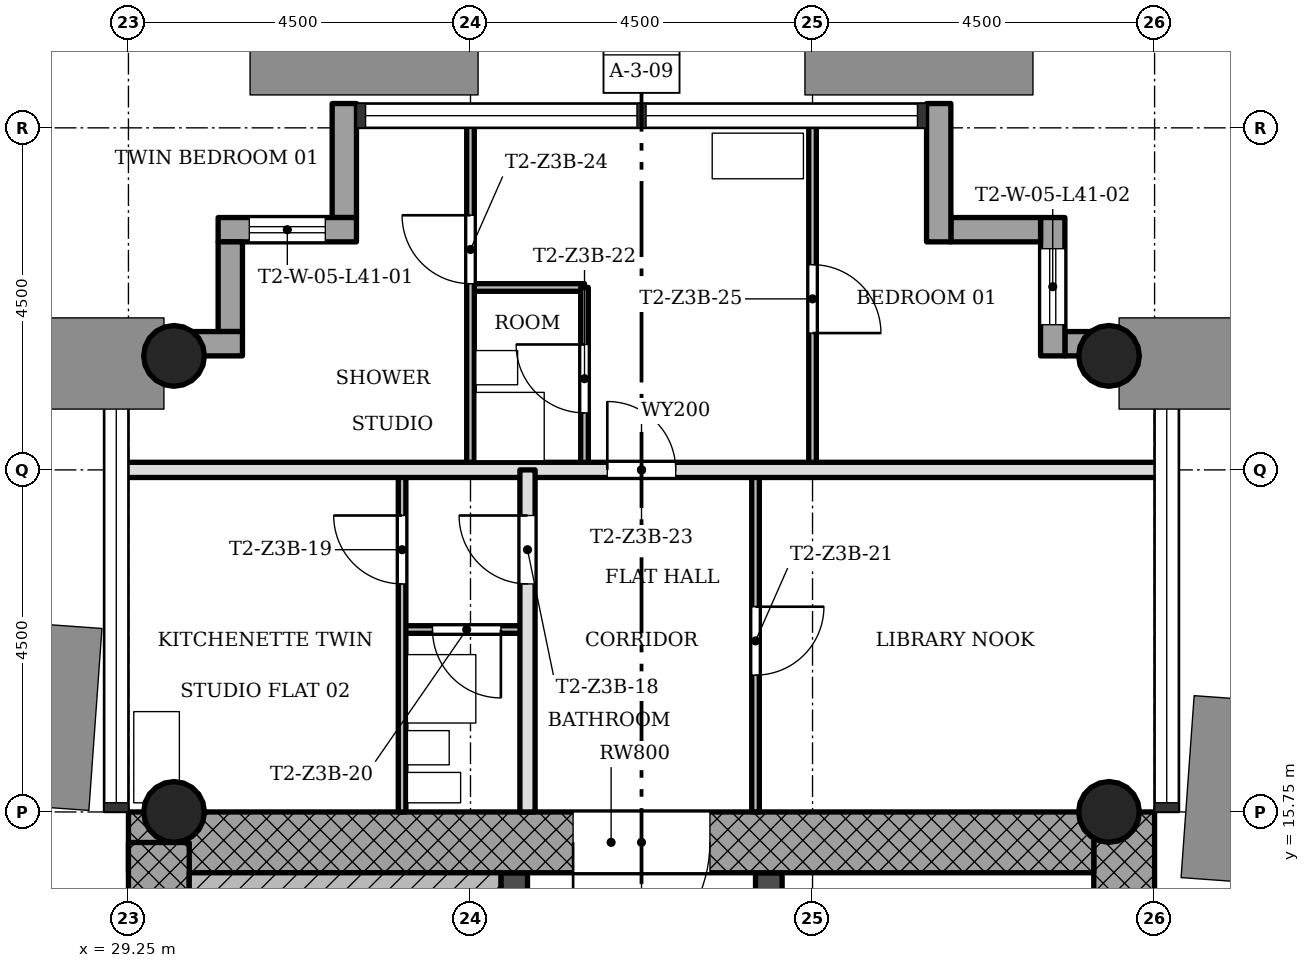
"""IFC4 building model, lengths in metres.
Left out: names, types, materials, properties, quantities, classifications, styles, units other than length and angle.
Written with IfcOpenShell. Run it as: python <this file> out.ifc"""

import sys

from ifc_helpers import new_model, si_unit, direction, frame, frame_2d, origin, origin_2d, place, context, subcontext, project, spatial, rectangle, hollow_circle, extrude, element, fill, save


model = new_model("IFC4")
c1 = context("Model", 3, precision=1e-05, world=origin(), true_north=direction((0.0, 1.0)))
c2 = subcontext(c1, "Body", "Model", "MODEL_VIEW")
j1 = project(units=[si_unit("LENGTHUNIT", "METRE"), si_unit("PLANEANGLEUNIT", "RADIAN")], contexts=[c1])
p1 = place(None, origin())
s1 = spatial("IfcSite", under=j1, at=p1, CompositionType="ELEMENT")
p2 = place(p1, origin())
s2 = spatial("IfcBuilding", under=s1, at=p2, CompositionType="ELEMENT")
p3 = place(p2, frame((0.0, 0.0, 150.7)))
s3 = spatial("IfcBuildingStorey", under=s2, at=p3, CompositionType="ELEMENT", Elevation=150.7)
p4 = place(p3, frame((42.35, 7.55, 0.0), z_axis=(0.0, 0.0, 1.0), x_axis=(0.0, 1.0, 0.0)))
e1 = element("IfcWall", 1, at=p4, inside=s3, PredefinedType="SHEAR", context=c2, shape_type="SweptSolid", body=[
    extrude(rectangle(XDim=8.2, YDim=0.8, at=frame_2d((4.1, 0.0))), origin(), (0.0, 0.0, 1.0), 3.4),
])
p5 = place(p3, frame((41.95, 15.35, 0.0), z_axis=(0.0, 0.0, 1.0), x_axis=(-1.0, 0.0, 0.0)))
e2 = element("IfcWall", 2, at=p5, inside=s3, PredefinedType="SHEAR", context=c2, shape_type="SweptSolid", body=[
    extrude(rectangle(XDim=12.7, YDim=0.8, at=frame_2d((6.35, 0.0))), origin(), (0.0, 0.0, 1.0), 3.4),
])
p6 = place(p5, frame((5.05, 0.0, 0.0)))
e3 = element("IfcOpeningElement", 3, at=p6, cuts=e2, PredefinedType="OPENING", context=c2, shape_type="SweptSolid", body=[
    extrude(rectangle(XDim=1.8, YDim=2.1, at=frame_2d((0.9, 1.05))), frame((0.0, 0.41, 0.0), z_axis=(0.0, -1.0, 0.0), x_axis=(1.0, 0.0, 0.0)), (0.0, 0.0, 1.0), 0.82),
])
p7 = place(p3, frame((29.65, 15.348, 0.0), z_axis=(0.0, 0.0, 1.0), x_axis=(0.0, -1.0, 0.0)))
e4 = element("IfcWall", 4, at=p7, inside=s3, PredefinedType="SHEAR", context=c2, shape_type="SweptSolid", body=[
    extrude(rectangle(XDim=8.796, YDim=0.8, at=frame_2d((4.398, 0.0))), origin(), (0.0, 0.0, 1.0), 3.4),
])
p8 = place(p3, frame((34.325, 7.55, 0.0), z_axis=(0.0, 0.0, 1.0), x_axis=(0.0, 1.0, 0.0)))
e5 = element("IfcWall", 5, at=p8, inside=s3, PredefinedType="SHEAR", context=c2, shape_type="SweptSolid", body=[
    extrude(rectangle(XDim=7.4, YDim=0.35, at=frame_2d((3.7, 0.0))), origin(), (0.0, 0.0, 1.0), 3.4),
])
p9 = place(p8, frame((0.85, 0.0, 0.0)))
e6 = element("IfcOpeningElement", 6, at=p9, cuts=e5, PredefinedType="OPENING", context=c2, shape_type="SweptSolid", body=[
    extrude(rectangle(XDim=0.9, YDim=2.1, at=frame_2d((0.45, 1.05))), frame((0.0, 0.185, 0.0), z_axis=(0.0, -1.0, 0.0), x_axis=(1.0, 0.0, 0.0)), (0.0, 0.0, 1.0), 0.37),
])
p10 = place(p3, frame((37.675, 7.55, 0.0), z_axis=(0.0, 0.0, 1.0), x_axis=(0.0, 1.0, 0.0)))
e7 = element("IfcWall", 7, at=p10, inside=s3, PredefinedType="SHEAR", context=c2, shape_type="SweptSolid", body=[
    extrude(rectangle(XDim=7.4, YDim=0.35, at=frame_2d((3.7, 0.0))), origin(), (0.0, 0.0, 1.0), 3.4),
])
p11 = place(p10, frame((0.95, 0.0, 0.0)))
e8 = element("IfcOpeningElement", 8, at=p11, cuts=e7, PredefinedType="OPENING", context=c2, shape_type="SweptSolid", body=[
    extrude(rectangle(XDim=1.1, YDim=2.1, at=frame_2d((0.55, 1.05))), frame((0.0, 0.185, 0.0), z_axis=(0.0, -1.0, 0.0), x_axis=(1.0, 0.0, 0.0)), (0.0, 0.0, 1.0), 0.37),
])
p12 = place(p10, frame((3.15, 0.0, 0.0)))
e9 = element("IfcOpeningElement", 9, at=p12, cuts=e7, PredefinedType="OPENING", context=c2, shape_type="SweptSolid", body=[
    extrude(rectangle(XDim=1.1, YDim=2.1, at=frame_2d((0.55, 1.05))), frame((0.0, 0.185, 0.0), z_axis=(0.0, -1.0, 0.0), x_axis=(1.0, 0.0, 0.0)), (0.0, 0.0, 1.0), 0.37),
])
p13 = place(p10, frame((5.35, 0.0, 0.0)))
e10 = element("IfcOpeningElement", 10, at=p13, cuts=e7, PredefinedType="OPENING", context=c2, shape_type="SweptSolid", body=[
    extrude(rectangle(XDim=1.1, YDim=2.1, at=frame_2d((0.55, 1.05))), frame((0.0, 0.185, 0.0), z_axis=(0.0, -1.0, 0.0), x_axis=(1.0, 0.0, 0.0)), (0.0, 0.0, 1.0), 0.37),
])
for number, where, z_axis, x_axis in (
    (11, (42.15, 15.75, 0.0), (0.0, 0.0, 1.0), (1.0, 0.0, 0.0)),
    (12, (29.85, 15.75, 0.0), (0.0, 0.0, 1.0), (1.0, 0.0, 0.0)),
    (13, (42.15, 21.75, 0.0), (0.0, 0.0, 1.0), (1.0, 0.0, 0.0)),
    (14, (29.85, 21.75, 0.0), (0.0, 0.0, 1.0), (1.0, 0.0, 0.0)),
):
    element("IfcColumn", number, at=place(p3, frame(where, z_axis=z_axis, x_axis=x_axis)), inside=s3, PredefinedType="COLUMN", context=c2, shape_type="SweptSolid", body=[
        extrude(hollow_circle(Radius=0.4, WallThickness=0.028, at=origin_2d()), origin(), (0.0, 0.0, 1.0), 3.4),
    ])
p14 = place(p3, frame((43.07, 21.91, -0.3), z_axis=(0.0, 0.0, 1.0), x_axis=(-1.0, 0.0, 0.0)))
e15 = element("IfcWall", 15, at=p14, inside=s3, PredefinedType="STANDARD", context=c2, shape_type="SweptSolid", body=[
    extrude(rectangle(XDim=1.5, YDim=0.32, at=frame_2d((0.75, 0.0))), origin(), (0.0, 0.0, 1.0), 3.4),
])
p15 = place(p3, frame((41.41, 21.75, -0.3), z_axis=(0.0, 0.0, 1.0), x_axis=(0.0, 1.0, 0.0)))
e16 = element("IfcWall", 16, at=p15, inside=s3, PredefinedType="STANDARD", context=c2, shape_type="SweptSolid", body=[
    extrude(rectangle(XDim=1.82, YDim=0.32, at=frame_2d((0.91, 0.0))), origin(), (0.0, 0.0, 1.0), 3.4),
])
p16 = place(p15, frame((0.41, 0.0, 1.2)))
e17 = element("IfcOpeningElement", 17, at=p16, cuts=e16, PredefinedType="OPENING", context=c2, shape_type="SweptSolid", body=[
    extrude(rectangle(XDim=1.0, YDim=1.5, at=frame_2d((0.5, 0.75))), frame((0.0, 0.17, 0.0), z_axis=(0.0, -1.0, 0.0), x_axis=(1.0, 0.0, 0.0)), (0.0, 0.0, 1.0), 0.34),
])
p17 = place(p3, frame((41.25, 23.41, -0.3), z_axis=(0.0, 0.0, 1.0), x_axis=(-1.0, 0.0, 0.0)))
e18 = element("IfcWall", 18, at=p17, inside=s3, PredefinedType="STANDARD", context=c2, shape_type="SweptSolid", body=[
    extrude(rectangle(XDim=1.18, YDim=0.32, at=frame_2d((0.59, 0.0))), origin(), (0.0, 0.0, 1.0), 3.4),
])
p18 = place(p3, frame((39.91, 23.25, -0.3), z_axis=(0.0, 0.0, 1.0), x_axis=(0.0, 1.0, 0.0)))
e19 = element("IfcWall", 19, at=p18, inside=s3, PredefinedType="STANDARD", context=c2, shape_type="SweptSolid", body=[
    extrude(rectangle(XDim=1.82, YDim=0.32, at=frame_2d((0.91, 0.0))), origin(), (0.0, 0.0, 1.0), 3.4),
])
p19 = place(p3, frame((32.09, 25.07, -0.3), z_axis=(0.0, 0.0, 1.0), x_axis=(0.0, -1.0, 0.0)))
e20 = element("IfcWall", 20, at=p19, inside=s3, PredefinedType="STANDARD", context=c2, shape_type="SweptSolid", body=[
    extrude(rectangle(XDim=1.5, YDim=0.32, at=frame_2d((0.75, 0.0))), origin(), (0.0, 0.0, 1.0), 3.4),
])
p20 = place(p3, frame((32.25, 23.41, -0.3), z_axis=(0.0, 0.0, 1.0), x_axis=(-1.0, 0.0, 0.0)))
e21 = element("IfcWall", 21, at=p20, inside=s3, PredefinedType="STANDARD", context=c2, shape_type="SweptSolid", body=[
    extrude(rectangle(XDim=1.82, YDim=0.32, at=frame_2d((0.91, 0.0))), origin(), (0.0, 0.0, 1.0), 3.4),
])
p21 = place(p20, frame((0.41, 0.0, 1.2)))
e22 = element("IfcOpeningElement", 22, at=p21, cuts=e21, PredefinedType="OPENING", context=c2, shape_type="SweptSolid", body=[
    extrude(rectangle(XDim=1.0, YDim=1.5, at=frame_2d((0.5, 0.75))), frame((0.0, 0.17, 0.0), z_axis=(0.0, -1.0, 0.0), x_axis=(1.0, 0.0, 0.0)), (0.0, 0.0, 1.0), 0.34),
])
p22 = place(p3, frame((30.59, 23.25, -0.3), z_axis=(0.0, 0.0, 1.0), x_axis=(0.0, -1.0, 0.0)))
e23 = element("IfcWall", 23, at=p22, inside=s3, PredefinedType="STANDARD", context=c2, shape_type="SweptSolid", body=[
    extrude(rectangle(XDim=1.18, YDim=0.32, at=frame_2d((0.59, 0.0))), origin(), (0.0, 0.0, 1.0), 3.4),
])
p23 = place(p3, frame((30.75, 21.91, -0.3), z_axis=(0.0, 0.0, 1.0), x_axis=(-1.0, 0.0, 0.0)))
e24 = element("IfcWall", 24, at=p23, inside=s3, PredefinedType="STANDARD", context=c2, shape_type="SweptSolid", body=[
    extrude(rectangle(XDim=1.82, YDim=0.32, at=frame_2d((0.91, 0.0))), origin(), (0.0, 0.0, 1.0), 3.4),
])
p24 = place(p3, frame((34.5, 18.15, 0.0), z_axis=(0.0, 0.0, 1.0), x_axis=(-1.0, 0.0, 0.0)))
e25 = element("IfcWall", 25, at=p24, inside=s3, PredefinedType="PARTITIONING", context=c2, shape_type="SweptSolid", body=[
    extrude(rectangle(XDim=1.65, YDim=0.1, at=frame_2d((0.825, 0.0))), origin(), (0.0, 0.0, 1.0), 3.0),
])
p25 = place(p24, frame((0.35, 0.0, 0.0)))
e26 = element("IfcOpeningElement", 26, at=p25, cuts=e25, PredefinedType="OPENING", context=c2, shape_type="SweptSolid", body=[
    extrude(rectangle(XDim=0.9, YDim=2.1, at=frame_2d((0.45, 1.05))), frame((0.0, 0.06, 0.0), z_axis=(0.0, -1.0, 0.0), x_axis=(1.0, 0.0, 0.0)), (0.0, 0.0, 1.0), 0.12),
])
p26 = place(p3, frame((42.85, 20.25, 0.0), z_axis=(0.0, 0.0, 1.0), x_axis=(-1.0, 0.0, 0.0)))
e27 = element("IfcWall", 27, at=p26, inside=s3, PredefinedType="SOLIDWALL", context=c2, shape_type="SweptSolid", body=[
    extrude(rectangle(XDim=13.7, YDim=0.2, at=frame_2d((6.85, 0.0))), origin(), (0.0, 0.0, 1.0), 3.0),
])
p27 = place(p26, frame((6.4, 0.0, 0.0)))
e28 = element("IfcOpeningElement", 28, at=p27, cuts=e27, PredefinedType="OPENING", context=c2, shape_type="SweptSolid", body=[
    extrude(rectangle(XDim=0.9, YDim=2.1, at=frame_2d((0.45, 1.05))), frame((0.0, 0.11, 0.0), z_axis=(0.0, -1.0, 0.0), x_axis=(1.0, 0.0, 0.0)), (0.0, 0.0, 1.0), 0.22),
])
p28 = place(p3, frame((35.25, 22.65, 0.0), z_axis=(0.0, 0.0, 1.0), x_axis=(-1.0, 0.0, 0.0)))
e29 = element("IfcWall", 29, at=p28, inside=s3, PredefinedType="PARTITIONING", context=c2, shape_type="SweptSolid", body=[
    extrude(rectangle(XDim=1.5, YDim=0.1, at=frame_2d((0.75, 0.0))), origin(), (0.0, 0.0, 1.0), 3.0),
])
p29 = place(p3, frame((38.25, 20.25, 0.0), z_axis=(0.0, 0.0, 1.0), x_axis=(0.0, 1.0, 0.0)))
e30 = element("IfcWall", 30, at=p29, inside=s3, PredefinedType="PARTITIONING", context=c2, shape_type="SweptSolid", body=[
    extrude(rectangle(XDim=4.6, YDim=0.1, at=frame_2d((2.3, 0.0))), origin(), (0.0, 0.0, 1.0), 3.0),
])
p30 = place(p29, frame((1.8, 0.0, 0.0)))
e31 = element("IfcOpeningElement", 31, at=p30, cuts=e30, PredefinedType="OPENING", context=c2, shape_type="SweptSolid", body=[
    extrude(rectangle(XDim=0.9, YDim=2.1, at=frame_2d((0.45, 1.05))), frame((0.0, 0.06, 0.0), z_axis=(0.0, -1.0, 0.0), x_axis=(1.0, 0.0, 0.0)), (0.0, 0.0, 1.0), 0.12),
])
p31 = place(p3, frame((37.5, 15.75, 0.0), z_axis=(0.0, 0.0, 1.0), x_axis=(0.0, 1.0, 0.0)))
e32 = element("IfcWall", 32, at=p31, inside=s3, PredefinedType="PARTITIONING", context=c2, shape_type="SweptSolid", body=[
    extrude(rectangle(XDim=4.5, YDim=0.1, at=frame_2d((2.25, 0.0))), origin(), (0.0, 0.0, 1.0), 3.0),
])
p32 = place(p31, frame((1.8, 0.0, 0.0)))
e33 = element("IfcOpeningElement", 33, at=p32, cuts=e32, PredefinedType="OPENING", context=c2, shape_type="SweptSolid", body=[
    extrude(rectangle(XDim=0.9, YDim=2.1, at=frame_2d((0.45, 1.05))), frame((0.0, 0.06, 0.0), z_axis=(0.0, -1.0, 0.0), x_axis=(1.0, 0.0, 0.0)), (0.0, 0.0, 1.0), 0.12),
])
p33 = place(p3, frame((35.25, 20.25, 0.0), z_axis=(0.0, 0.0, 1.0), x_axis=(0.0, 1.0, 0.0)))
e34 = element("IfcWall", 34, at=p33, inside=s3, PredefinedType="PARTITIONING", context=c2, shape_type="SweptSolid", body=[
    extrude(rectangle(XDim=2.4, YDim=0.1, at=frame_2d((1.2, 0.0))), origin(), (0.0, 0.0, 1.0), 3.0),
])
p34 = place(p33, frame((0.75, 0.0, 0.0)))
e35 = element("IfcOpeningElement", 35, at=p34, cuts=e34, PredefinedType="OPENING", context=c2, shape_type="SweptSolid", body=[
    extrude(rectangle(XDim=0.9, YDim=2.1, at=frame_2d((0.45, 1.05))), frame((0.0, 0.06, 0.0), z_axis=(0.0, -1.0, 0.0), x_axis=(1.0, 0.0, 0.0)), (0.0, 0.0, 1.0), 0.12),
])
p35 = place(p3, frame((34.5, 15.75, 0.0), z_axis=(0.0, 0.0, 1.0), x_axis=(0.0, 1.0, 0.0)))
e36 = element("IfcWall", 36, at=p35, inside=s3, PredefinedType="SOLIDWALL", context=c2, shape_type="SweptSolid", body=[
    extrude(rectangle(XDim=4.5, YDim=0.2, at=frame_2d((2.25, 0.0))), origin(), (0.0, 0.0, 1.0), 3.0),
])
p36 = place(p35, frame((3.0, 0.0, 0.0)))
e37 = element("IfcOpeningElement", 37, at=p36, cuts=e36, PredefinedType="OPENING", context=c2, shape_type="SweptSolid", body=[
    extrude(rectangle(XDim=0.9, YDim=2.1, at=frame_2d((0.45, 1.05))), frame((0.0, 0.11, 0.0), z_axis=(0.0, -1.0, 0.0), x_axis=(1.0, 0.0, 0.0)), (0.0, 0.0, 1.0), 0.22),
])
p37 = place(p3, frame((33.75, 20.25, 0.0), z_axis=(0.0, 0.0, 1.0), x_axis=(0.0, 1.0, 0.0)))
e38 = element("IfcWall", 38, at=p37, inside=s3, PredefinedType="PARTITIONING", context=c2, shape_type="SweptSolid", body=[
    extrude(rectangle(XDim=4.6, YDim=0.1, at=frame_2d((2.3, 0.0))), origin(), (0.0, 0.0, 1.0), 3.0),
])
p38 = place(p37, frame((2.45, 0.0, 0.0)))
e39 = element("IfcOpeningElement", 39, at=p38, cuts=e38, PredefinedType="OPENING", context=c2, shape_type="SweptSolid", body=[
    extrude(rectangle(XDim=0.9, YDim=2.1, at=frame_2d((0.45, 1.05))), frame((0.0, 0.06, 0.0), z_axis=(0.0, -1.0, 0.0), x_axis=(1.0, 0.0, 0.0)), (0.0, 0.0, 1.0), 0.12),
])
p39 = place(p3, frame((32.85, 15.75, 0.0), z_axis=(0.0, 0.0, 1.0), x_axis=(0.0, 1.0, 0.0)))
e40 = element("IfcWall", 40, at=p39, inside=s3, PredefinedType="PARTITIONING", context=c2, shape_type="SweptSolid", body=[
    extrude(rectangle(XDim=4.5, YDim=0.1, at=frame_2d((2.25, 0.0))), origin(), (0.0, 0.0, 1.0), 3.0),
])
p40 = place(p39, frame((3.0, 0.0, 0.0)))
e41 = element("IfcOpeningElement", 41, at=p40, cuts=e40, PredefinedType="OPENING", context=c2, shape_type="SweptSolid", body=[
    extrude(rectangle(XDim=0.9, YDim=2.1, at=frame_2d((0.45, 1.05))), frame((0.0, 0.06, 0.0), z_axis=(0.0, -1.0, 0.0), x_axis=(1.0, 0.0, 0.0)), (0.0, 0.0, 1.0), 0.12),
])
p41 = place(p3, frame((34.15, 14.75, 0.0), z_axis=(0.0, 0.0, 1.0), x_axis=(-1.0, 0.0, 0.0)))
e42 = element("IfcWall", 42, at=p41, inside=s3, PredefinedType="SHEAR", context=c2, shape_type="SweptSolid", body=[
    extrude(rectangle(XDim=4.1, YDim=0.4, at=frame_2d((2.05, 0.0))), origin(), (0.0, 0.0, 1.0), 3.4),
])
p42 = place(p36, origin())
e43 = element("IfcDoor", 43, at=p42, inside=s3, OperationType="SINGLE_SWING_LEFT", PredefinedType="DOOR", context=c2, shape_type="SweptSolid", body=[
    extrude(rectangle(XDim=0.9, YDim=2.1, at=frame_2d((0.45, 1.05))), frame((0.0, 0.025, 0.0), z_axis=(0.0, -1.0, 0.0), x_axis=(1.0, 0.0, 0.0)), (0.0, 0.0, 1.0), 0.05),
])
fill(e37, e43)
p43 = place(p40, origin())
e44 = element("IfcDoor", 44, at=p43, inside=s3, OperationType="SINGLE_SWING_LEFT", PredefinedType="DOOR", context=c2, shape_type="SweptSolid", body=[
    extrude(rectangle(XDim=0.9, YDim=2.1, at=frame_2d((0.45, 1.05))), frame((0.0, 0.025, 0.0), z_axis=(0.0, -1.0, 0.0), x_axis=(1.0, 0.0, 0.0)), (0.0, 0.0, 1.0), 0.05),
])
fill(e41, e44)
p44 = place(p25, origin())
e45 = element("IfcDoor", 45, at=p44, inside=s3, OperationType="SINGLE_SWING_RIGHT", PredefinedType="DOOR", context=c2, shape_type="SweptSolid", body=[
    extrude(rectangle(XDim=0.9, YDim=2.1, at=frame_2d((0.45, 1.05))), frame((0.0, 0.025, 0.0), z_axis=(0.0, -1.0, 0.0), x_axis=(1.0, 0.0, 0.0)), (0.0, 0.0, 1.0), 0.05),
])
fill(e26, e45)
p45 = place(p32, origin())
e46 = element("IfcDoor", 46, at=p45, inside=s3, OperationType="SINGLE_SWING_RIGHT", PredefinedType="DOOR", context=c2, shape_type="SweptSolid", body=[
    extrude(rectangle(XDim=0.9, YDim=2.1, at=frame_2d((0.45, 1.05))), frame((0.0, 0.025, 0.0), z_axis=(0.0, -1.0, 0.0), x_axis=(1.0, 0.0, 0.0)), (0.0, 0.0, 1.0), 0.05),
])
fill(e33, e46)
p46 = place(p34, origin())
e47 = element("IfcDoor", 47, at=p46, inside=s3, OperationType="SINGLE_SWING_LEFT", PredefinedType="DOOR", context=c2, shape_type="SweptSolid", body=[
    extrude(rectangle(XDim=0.9, YDim=2.1, at=frame_2d((0.45, 1.05))), frame((0.0, 0.025, 0.0), z_axis=(0.0, -1.0, 0.0), x_axis=(1.0, 0.0, 0.0)), (0.0, 0.0, 1.0), 0.05),
])
fill(e35, e47)
p47 = place(p27, origin())
e48 = element("IfcDoor", 48, at=p47, inside=s3, OperationType="SINGLE_SWING_RIGHT", PredefinedType="DOOR", context=c2, shape_type="SweptSolid", body=[
    extrude(rectangle(XDim=0.9, YDim=2.1, at=frame_2d((0.45, 1.05))), frame((0.0, 0.025, 0.0), z_axis=(0.0, -1.0, 0.0), x_axis=(1.0, 0.0, 0.0)), (0.0, 0.0, 1.0), 0.05),
])
fill(e28, e48)
p48 = place(p38, origin())
e49 = element("IfcDoor", 49, at=p48, inside=s3, OperationType="SINGLE_SWING_LEFT", PredefinedType="DOOR", context=c2, shape_type="SweptSolid", body=[
    extrude(rectangle(XDim=0.9, YDim=2.1, at=frame_2d((0.45, 1.05))), frame((0.0, 0.025, 0.0), z_axis=(0.0, -1.0, 0.0), x_axis=(1.0, 0.0, 0.0)), (0.0, 0.0, 1.0), 0.05),
])
fill(e39, e49)
p49 = place(p30, origin())
e50 = element("IfcDoor", 50, at=p49, inside=s3, OperationType="SINGLE_SWING_LEFT", PredefinedType="DOOR", context=c2, shape_type="SweptSolid", body=[
    extrude(rectangle(XDim=0.9, YDim=2.1, at=frame_2d((0.45, 1.05))), frame((0.0, 0.025, 0.0), z_axis=(0.0, -1.0, 0.0), x_axis=(1.0, 0.0, 0.0)), (0.0, 0.0, 1.0), 0.05),
])
fill(e31, e50)
p50 = place(p6, origin())
e51 = element("IfcDoor", 51, at=p50, inside=s3, OperationType="SINGLE_SWING_LEFT", PredefinedType="DOOR", context=c2, shape_type="SweptSolid", body=[
    extrude(rectangle(XDim=1.8, YDim=2.1, at=frame_2d((0.9, 1.05))), frame((0.0, 0.025, 0.0), z_axis=(0.0, -1.0, 0.0), x_axis=(1.0, 0.0, 0.0)), (0.0, 0.0, 1.0), 0.05),
])
fill(e3, e51)
p51 = place(p21, origin())
e52 = element("IfcWindow", 52, at=p51, inside=s3, PartitioningType="SINGLE_PANEL", PredefinedType="WINDOW", context=c2, shape_type="SweptSolid", body=[
    extrude(rectangle(XDim=1.0, YDim=1.5, at=frame_2d((0.5, 0.75))), frame((0.0, 0.03, 0.0), z_axis=(0.0, -1.0, 0.0), x_axis=(1.0, 0.0, 0.0)), (0.0, 0.0, 1.0), 0.06),
])
fill(e22, e52)
p52 = place(p16, origin())
e53 = element("IfcWindow", 53, at=p52, inside=s3, PartitioningType="SINGLE_PANEL", PredefinedType="WINDOW", context=c2, shape_type="SweptSolid", body=[
    extrude(rectangle(XDim=1.0, YDim=1.5, at=frame_2d((0.5, 0.75))), frame((0.0, 0.03, 0.0), z_axis=(0.0, -1.0, 0.0), x_axis=(1.0, 0.0, 0.0)), (0.0, 0.0, 1.0), 0.06),
])
fill(e17, e53)
save(model, sys.argv[1])
